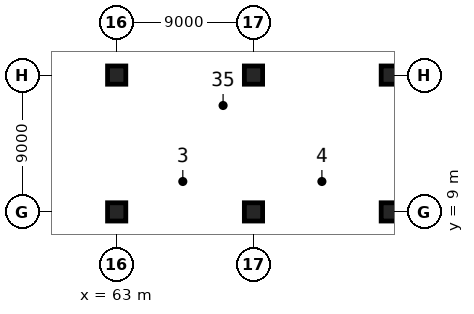
"""IFC4 building model, lengths in metres.
Left out: names, types, materials, properties, quantities, classifications, styles, units other than length and angle.
Written with IfcOpenShell. Run it as: python <this file> out.ifc"""

import sys

from ifc_helpers import new_model, si_unit, direction, frame, origin, origin_2d, place, context, subcontext, project, spatial, rectangle, extrude, element, save


model = new_model("IFC4")
c1 = context("Model", 3, precision=1e-05, world=origin(), true_north=direction((0.0, 1.0)))
c2 = subcontext(c1, "Body", "Model", "MODEL_VIEW")
j1 = project(units=[si_unit("LENGTHUNIT", "METRE"), si_unit("PLANEANGLEUNIT", "RADIAN")], contexts=[c1])
p1 = place(None, origin())
s1 = spatial("IfcSite", under=j1, at=p1, CompositionType="ELEMENT")
p2 = place(p1, origin())
s2 = spatial("IfcBuilding", under=s1, at=p2, CompositionType="ELEMENT")
p3 = place(p2, frame((0.0, 0.0, -9.0)))
s3 = spatial("IfcBuildingStorey", under=s2, at=p3, CompositionType="ELEMENT", Elevation=-9.0)
for number, where, z_axis, x_axis in (
    (1, (63.0, 9.0, 0.0), (0.0, 0.0, 1.0), (1.0, 0.0, 0.0)),
    (2, (63.0, 18.0, 0.0), (0.0, 0.0, 1.0), (1.0, 0.0, 0.0)),
    (3, (72.0, 9.0, 0.0), (0.0, 0.0, 1.0), (1.0, 0.0, 0.0)),
    (4, (72.0, 18.0, 0.0), (0.0, 0.0, 1.0), (1.0, 0.0, 0.0)),
    (5, (81.0, 9.0, 0.0), (0.0, 0.0, 1.0), (1.0, 0.0, 0.0)),
    (6, (81.0, 18.0, 0.0), (0.0, 0.0, 1.0), (1.0, 0.0, 0.0)),
):
    element("IfcColumn", number, at=place(p3, frame(where, z_axis=z_axis, x_axis=x_axis)), inside=s3, PredefinedType="COLUMN", context=c2, shape_type="SweptSolid", body=[
        extrude(rectangle(XDim=1.2, YDim=1.2, at=origin_2d()), origin(), (0.0, 0.0, 1.0), 4.5),
    ])
save(model, sys.argv[1])
